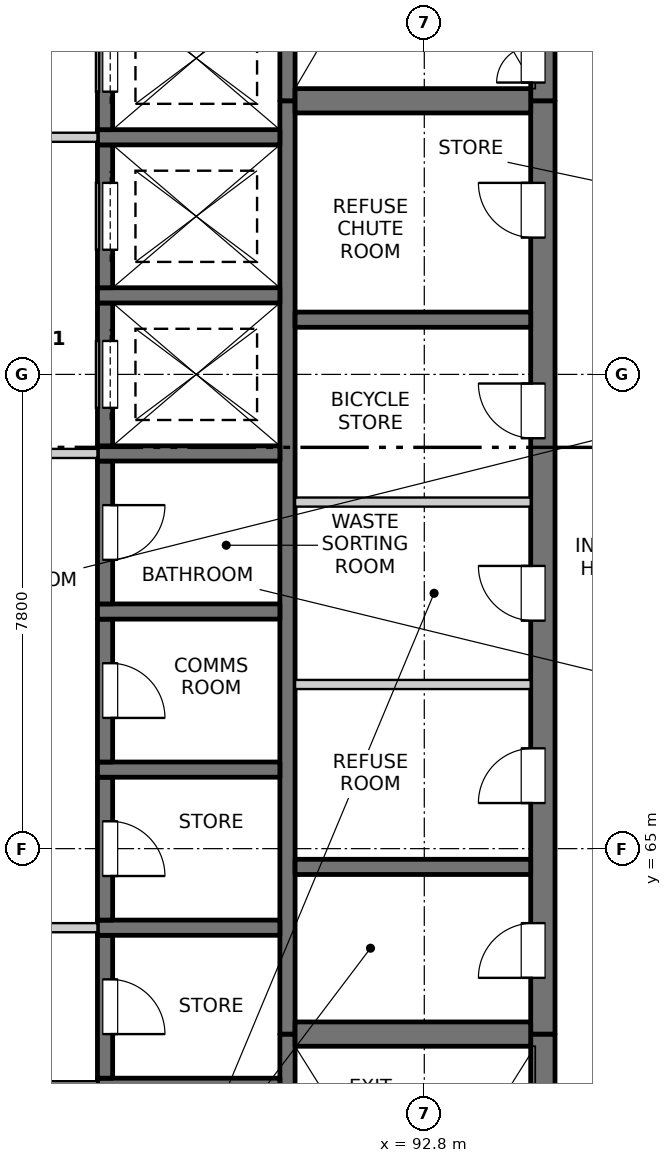
"""IFC4 building model, lengths in metres.
Left out: names, types, materials, properties, quantities, classifications, styles, units other than length and angle.
Written with IfcOpenShell. Run it as: python <this file> out.ifc"""

import sys

from ifc_helpers import new_model, si_unit, direction, frame, frame_2d, origin, place, context, subcontext, project, spatial, rectangle, extrude, element, fill, save


model = new_model("IFC4")
c1 = context("Model", 3, precision=1e-05, world=origin(), true_north=direction((0.0, 1.0)))
c2 = subcontext(c1, "Body", "Model", "MODEL_VIEW")
j1 = project(units=[si_unit("LENGTHUNIT", "METRE"), si_unit("PLANEANGLEUNIT", "RADIAN")], contexts=[c1])
p1 = place(None, origin())
s1 = spatial("IfcSite", under=j1, at=p1, CompositionType="ELEMENT")
p2 = place(p1, origin())
s2 = spatial("IfcBuilding", under=s1, at=p2, CompositionType="ELEMENT")
p3 = place(p2, frame((0.0, 0.0, 197.3)))
s3 = spatial("IfcBuildingStorey", under=s2, at=p3, CompositionType="ELEMENT", Elevation=197.3)
p4 = place(p3, frame((94.75, 55.05, -0.3), z_axis=(0.0, 0.0, 1.0), x_axis=(0.0, 1.0, 0.0)))
e1 = element("IfcWall", 1, at=p4, inside=s3, PredefinedType="SOLIDWALL", context=c2, shape_type="SweptSolid", body=[
    extrude(rectangle(XDim=6.9, YDim=0.4, at=frame_2d((3.45, 0.0))), origin(), (0.0, 0.0, 1.0), 3.45),
])
p5 = place(p4, frame((0.6, 0.0, 0.3)))
e2 = element("IfcOpeningElement", 2, at=p5, cuts=e1, PredefinedType="OPENING", context=c2, shape_type="SweptSolid", body=[
    extrude(rectangle(XDim=1.2, YDim=2.1, at=frame_2d((0.6, 1.05))), frame((0.0, 0.21, 0.0), z_axis=(0.0, -1.0, 0.0), x_axis=(1.0, 0.0, 0.0)), (0.0, 0.0, 1.0), 0.42),
])
p6 = place(p3, frame((94.75, 61.95, -0.3), z_axis=(0.0, 0.0, 1.0), x_axis=(0.0, 1.0, 0.0)))
e3 = element("IfcWall", 3, at=p6, inside=s3, PredefinedType="SOLIDWALL", context=c2, shape_type="SweptSolid", body=[
    extrude(rectangle(XDim=15.35, YDim=0.4, at=frame_2d((7.675, 0.0))), origin(), (0.0, 0.0, 1.0), 3.45),
])
p7 = place(p6, frame((0.925, 0.0, 0.3)))
e4 = element("IfcOpeningElement", 4, at=p7, cuts=e3, PredefinedType="OPENING", context=c2, shape_type="SweptSolid", body=[
    extrude(rectangle(XDim=0.9, YDim=2.1, at=frame_2d((0.45, 1.05))), frame((0.0, 0.21, 0.0), z_axis=(0.0, -1.0, 0.0), x_axis=(1.0, 0.0, 0.0)), (0.0, 0.0, 1.0), 0.42),
])
p8 = place(p6, frame((3.8, 0.0, 0.3)))
e5 = element("IfcOpeningElement", 5, at=p8, cuts=e3, PredefinedType="OPENING", context=c2, shape_type="SweptSolid", body=[
    extrude(rectangle(XDim=0.9, YDim=2.1, at=frame_2d((0.45, 1.05))), frame((0.0, 0.21, 0.0), z_axis=(0.0, -1.0, 0.0), x_axis=(1.0, 0.0, 0.0)), (0.0, 0.0, 1.0), 0.42),
])
p9 = place(p6, frame((6.8, 0.0, 0.3)))
e6 = element("IfcOpeningElement", 6, at=p9, cuts=e3, PredefinedType="OPENING", context=c2, shape_type="SweptSolid", body=[
    extrude(rectangle(XDim=0.9, YDim=2.1, at=frame_2d((0.45, 1.05))), frame((0.0, 0.21, 0.0), z_axis=(0.0, -1.0, 0.0), x_axis=(1.0, 0.0, 0.0)), (0.0, 0.0, 1.0), 0.42),
])
p10 = place(p6, frame((9.8, 0.0, 0.3)))
e7 = element("IfcOpeningElement", 7, at=p10, cuts=e3, PredefinedType="OPENING", context=c2, shape_type="SweptSolid", body=[
    extrude(rectangle(XDim=0.9, YDim=2.1, at=frame_2d((0.45, 1.05))), frame((0.0, 0.21, 0.0), z_axis=(0.0, -1.0, 0.0), x_axis=(1.0, 0.0, 0.0)), (0.0, 0.0, 1.0), 0.42),
])
p11 = place(p6, frame((13.1, 0.0, 0.3)))
e8 = element("IfcOpeningElement", 8, at=p11, cuts=e3, PredefinedType="OPENING", context=c2, shape_type="SweptSolid", body=[
    extrude(rectangle(XDim=0.9, YDim=2.1, at=frame_2d((0.45, 1.05))), frame((0.0, 0.21, 0.0), z_axis=(0.0, -1.0, 0.0), x_axis=(1.0, 0.0, 0.0)), (0.0, 0.0, 1.0), 0.42),
])
p12 = place(p3, frame((94.75, 77.3, -0.3), z_axis=(0.0, 0.0, 1.0), x_axis=(0.0, 1.0, 0.0)))
e9 = element("IfcWall", 9, at=p12, inside=s3, PredefinedType="SOLIDWALL", context=c2, shape_type="SweptSolid", body=[
    extrude(rectangle(XDim=7.4, YDim=0.4, at=frame_2d((3.7, 0.0))), origin(), (0.0, 0.0, 1.0), 3.45),
])
p13 = place(p12, frame((0.3, 0.0, 0.3)))
e10 = element("IfcOpeningElement", 10, at=p13, cuts=e9, PredefinedType="OPENING", context=c2, shape_type="SweptSolid", body=[
    extrude(rectangle(XDim=1.2, YDim=2.1, at=frame_2d((0.6, 1.05))), frame((0.0, 0.21, 0.0), z_axis=(0.0, -1.0, 0.0), x_axis=(1.0, 0.0, 0.0)), (0.0, 0.0, 1.0), 0.42),
])
p14 = place(p3, frame((90.55, 55.45, -0.3), z_axis=(0.0, 0.0, 1.0), x_axis=(0.0, 1.0, 0.0)))
e11 = element("IfcWall", 11, at=p14, inside=s3, PredefinedType="SOLIDWALL", context=c2, shape_type="SweptSolid", body=[
    extrude(rectangle(XDim=6.5, YDim=0.25, at=frame_2d((3.25, 0.0))), origin(), (0.0, 0.0, 1.0), 3.45),
])
p15 = place(p3, frame((90.55, 61.95, -0.3), z_axis=(0.0, 0.0, 1.0), x_axis=(0.0, 1.0, 0.0)))
e12 = element("IfcWall", 12, at=p15, inside=s3, PredefinedType="SOLIDWALL", context=c2, shape_type="SweptSolid", body=[
    extrude(rectangle(XDim=15.35, YDim=0.25, at=frame_2d((7.675, 0.0))), origin(), (0.0, 0.0, 1.0), 3.45),
])
p16 = place(p3, frame((90.55, 77.3, -0.3), z_axis=(0.0, 0.0, 1.0), x_axis=(0.0, 1.0, 0.0)))
e13 = element("IfcWall", 13, at=p16, inside=s3, PredefinedType="SOLIDWALL", context=c2, shape_type="SweptSolid", body=[
    extrude(rectangle(XDim=7.0, YDim=0.25, at=frame_2d((3.5, 0.0))), origin(), (0.0, 0.0, 1.0), 3.45),
])
p17 = place(p3, frame((87.425, 61.1, -0.3), z_axis=(0.0, 0.0, 1.0), x_axis=(1.0, 0.0, 0.0)))
e14 = element("IfcWall", 14, at=p17, inside=s3, PredefinedType="SOLIDWALL", context=c2, shape_type="SweptSolid", body=[
    extrude(rectangle(XDim=3.0, YDim=0.25, at=frame_2d((1.5, 0.0))), origin(), (0.0, 0.0, 1.0), 3.45),
])
p18 = place(p3, frame((87.55, 61.225, -0.3), z_axis=(0.0, 0.0, 1.0), x_axis=(0.0, 1.0, 0.0)))
e15 = element("IfcWall", 15, at=p18, inside=s3, PredefinedType="SOLIDWALL", context=c2, shape_type="SweptSolid", body=[
    extrude(rectangle(XDim=2.35, YDim=0.25, at=frame_2d((1.175, 0.0))), origin(), (0.0, 0.0, 1.0), 3.45),
])
p19 = place(p18, frame((0.725, 0.0, 0.3)))
e16 = element("IfcOpeningElement", 16, at=p19, cuts=e15, PredefinedType="OPENING", context=c2, shape_type="SweptSolid", body=[
    extrude(rectangle(XDim=0.9, YDim=2.1, at=frame_2d((0.45, 1.05))), frame((0.0, 0.135, 0.0), z_axis=(0.0, -1.0, 0.0), x_axis=(1.0, 0.0, 0.0)), (0.0, 0.0, 1.0), 0.27),
])
p20 = place(p3, frame((87.425, 63.7, -0.3), z_axis=(0.0, 0.0, 1.0), x_axis=(1.0, 0.0, 0.0)))
e17 = element("IfcWall", 17, at=p20, inside=s3, PredefinedType="SOLIDWALL", context=c2, shape_type="SweptSolid", body=[
    extrude(rectangle(XDim=3.0, YDim=0.25, at=frame_2d((1.5, 0.0))), origin(), (0.0, 0.0, 1.0), 3.45),
])
p21 = place(p3, frame((87.55, 63.825, -0.3), z_axis=(0.0, 0.0, 1.0), x_axis=(0.0, 1.0, 0.0)))
e18 = element("IfcWall", 18, at=p21, inside=s3, PredefinedType="SOLIDWALL", context=c2, shape_type="SweptSolid", body=[
    extrude(rectangle(XDim=2.35, YDim=0.25, at=frame_2d((1.175, 0.0))), origin(), (0.0, 0.0, 1.0), 3.45),
])
p22 = place(p21, frame((0.725, 0.0, 0.3)))
e19 = element("IfcOpeningElement", 19, at=p22, cuts=e18, PredefinedType="OPENING", context=c2, shape_type="SweptSolid", body=[
    extrude(rectangle(XDim=0.9, YDim=2.1, at=frame_2d((0.45, 1.05))), frame((0.0, 0.135, 0.0), z_axis=(0.0, -1.0, 0.0), x_axis=(1.0, 0.0, 0.0)), (0.0, 0.0, 1.0), 0.27),
])
p23 = place(p3, frame((87.425, 66.3, -0.3), z_axis=(0.0, 0.0, 1.0), x_axis=(1.0, 0.0, 0.0)))
e20 = element("IfcWall", 20, at=p23, inside=s3, PredefinedType="SOLIDWALL", context=c2, shape_type="SweptSolid", body=[
    extrude(rectangle(XDim=3.0, YDim=0.25, at=frame_2d((1.5, 0.0))), origin(), (0.0, 0.0, 1.0), 3.45),
])
p24 = place(p3, frame((87.55, 66.425, -0.3), z_axis=(0.0, 0.0, 1.0), x_axis=(0.0, 1.0, 0.0)))
e21 = element("IfcWall", 21, at=p24, inside=s3, PredefinedType="SOLIDWALL", context=c2, shape_type="SweptSolid", body=[
    extrude(rectangle(XDim=2.35, YDim=0.25, at=frame_2d((1.175, 0.0))), origin(), (0.0, 0.0, 1.0), 3.45),
])
p25 = place(p24, frame((0.725, 0.0, 0.3)))
e22 = element("IfcOpeningElement", 22, at=p25, cuts=e21, PredefinedType="OPENING", context=c2, shape_type="SweptSolid", body=[
    extrude(rectangle(XDim=0.9, YDim=2.1, at=frame_2d((0.45, 1.05))), frame((0.0, 0.135, 0.0), z_axis=(0.0, -1.0, 0.0), x_axis=(1.0, 0.0, 0.0)), (0.0, 0.0, 1.0), 0.27),
])
p26 = place(p3, frame((87.425, 68.9, -0.3), z_axis=(0.0, 0.0, 1.0), x_axis=(1.0, 0.0, 0.0)))
e23 = element("IfcWall", 23, at=p26, inside=s3, PredefinedType="SOLIDWALL", context=c2, shape_type="SweptSolid", body=[
    extrude(rectangle(XDim=3.0, YDim=0.25, at=frame_2d((1.5, 0.0))), origin(), (0.0, 0.0, 1.0), 3.45),
])
p27 = place(p3, frame((87.55, 69.025, -0.3), z_axis=(0.0, 0.0, 1.0), x_axis=(0.0, 1.0, 0.0)))
e24 = element("IfcWall", 24, at=p27, inside=s3, PredefinedType="SOLIDWALL", context=c2, shape_type="SweptSolid", body=[
    extrude(rectangle(XDim=2.35, YDim=0.25, at=frame_2d((1.175, 0.0))), origin(), (0.0, 0.0, 1.0), 3.45),
])
p28 = place(p27, frame((0.725, 0.0, 0.3)))
e25 = element("IfcOpeningElement", 25, at=p28, cuts=e24, PredefinedType="OPENING", context=c2, shape_type="SweptSolid", body=[
    extrude(rectangle(XDim=0.9, YDim=2.1, at=frame_2d((0.45, 1.05))), frame((0.0, 0.135, 0.0), z_axis=(0.0, -1.0, 0.0), x_axis=(1.0, 0.0, 0.0)), (0.0, 0.0, 1.0), 0.27),
])
p29 = place(p3, frame((87.425, 71.5, -0.3), z_axis=(0.0, 0.0, 1.0), x_axis=(1.0, 0.0, 0.0)))
e26 = element("IfcWall", 26, at=p29, inside=s3, PredefinedType="SOLIDWALL", context=c2, shape_type="SweptSolid", body=[
    extrude(rectangle(XDim=3.0, YDim=0.25, at=frame_2d((1.5, 0.0))), origin(), (0.0, 0.0, 1.0), 3.45),
])
p30 = place(p3, frame((87.55, 71.625, -0.3), z_axis=(0.0, 0.0, 1.0), x_axis=(0.0, 1.0, 0.0)))
e27 = element("IfcWall", 27, at=p30, inside=s3, PredefinedType="SOLIDWALL", context=c2, shape_type="SweptSolid", body=[
    extrude(rectangle(XDim=2.35, YDim=0.25, at=frame_2d((1.175, 0.0))), origin(), (0.0, 0.0, 1.0), 3.45),
])
p31 = place(p30, frame((0.625, 0.0, 0.3)))
e28 = element("IfcOpeningElement", 28, at=p31, cuts=e27, PredefinedType="OPENING", context=c2, shape_type="SweptSolid", body=[
    extrude(rectangle(XDim=1.1, YDim=2.1, at=frame_2d((0.55, 1.05))), frame((0.0, 0.135, 0.0), z_axis=(0.0, -1.0, 0.0), x_axis=(1.0, 0.0, 0.0)), (0.0, 0.0, 1.0), 0.27),
])
p32 = place(p3, frame((87.425, 74.1, -0.3), z_axis=(0.0, 0.0, 1.0), x_axis=(1.0, 0.0, 0.0)))
e29 = element("IfcWall", 29, at=p32, inside=s3, PredefinedType="SOLIDWALL", context=c2, shape_type="SweptSolid", body=[
    extrude(rectangle(XDim=3.0, YDim=0.25, at=frame_2d((1.5, 0.0))), origin(), (0.0, 0.0, 1.0), 3.45),
])
p33 = place(p3, frame((87.55, 74.225, -0.3), z_axis=(0.0, 0.0, 1.0), x_axis=(0.0, 1.0, 0.0)))
e30 = element("IfcWall", 30, at=p33, inside=s3, PredefinedType="SOLIDWALL", context=c2, shape_type="SweptSolid", body=[
    extrude(rectangle(XDim=2.35, YDim=0.25, at=frame_2d((1.175, 0.0))), origin(), (0.0, 0.0, 1.0), 3.45),
])
p34 = place(p33, frame((0.625, 0.0, 0.3)))
e31 = element("IfcOpeningElement", 31, at=p34, cuts=e30, PredefinedType="OPENING", context=c2, shape_type="SweptSolid", body=[
    extrude(rectangle(XDim=1.1, YDim=2.1, at=frame_2d((0.55, 1.05))), frame((0.0, 0.135, 0.0), z_axis=(0.0, -1.0, 0.0), x_axis=(1.0, 0.0, 0.0)), (0.0, 0.0, 1.0), 0.27),
])
p35 = place(p3, frame((87.425, 76.7, -0.3), z_axis=(0.0, 0.0, 1.0), x_axis=(1.0, 0.0, 0.0)))
e32 = element("IfcWall", 32, at=p35, inside=s3, PredefinedType="SOLIDWALL", context=c2, shape_type="SweptSolid", body=[
    extrude(rectangle(XDim=3.0, YDim=0.25, at=frame_2d((1.5, 0.0))), origin(), (0.0, 0.0, 1.0), 3.45),
])
p36 = place(p3, frame((87.55, 76.825, -0.3), z_axis=(0.0, 0.0, 1.0), x_axis=(0.0, 1.0, 0.0)))
e33 = element("IfcWall", 33, at=p36, inside=s3, PredefinedType="SOLIDWALL", context=c2, shape_type="SweptSolid", body=[
    extrude(rectangle(XDim=2.35, YDim=0.25, at=frame_2d((1.175, 0.0))), origin(), (0.0, 0.0, 1.0), 3.45),
])
p37 = place(p36, frame((0.625, 0.0, 0.3)))
e34 = element("IfcOpeningElement", 34, at=p37, cuts=e33, PredefinedType="OPENING", context=c2, shape_type="SweptSolid", body=[
    extrude(rectangle(XDim=1.1, YDim=2.1, at=frame_2d((0.55, 1.05))), frame((0.0, 0.135, 0.0), z_axis=(0.0, -1.0, 0.0), x_axis=(1.0, 0.0, 0.0)), (0.0, 0.0, 1.0), 0.27),
])
p38 = place(p3, frame((90.675, 61.95, -0.3), z_axis=(0.0, 0.0, 1.0), x_axis=(1.0, 0.0, 0.0)))
e35 = element("IfcWall", 35, at=p38, inside=s3, PredefinedType="SOLIDWALL", context=c2, shape_type="SweptSolid", body=[
    extrude(rectangle(XDim=3.875, YDim=0.4, at=frame_2d((1.938, 0.0))), origin(), (0.0, 0.0, 1.0), 3.45),
])
for number, where, z_axis, x_axis in (
    (36, (90.675, 64.7, -0.3), (0.0, 0.0, 1.0), (1.0, 0.0, 0.0)),
    (37, (90.675, 73.7, -0.3), (0.0, 0.0, 1.0), (1.0, 0.0, 0.0)),
):
    element("IfcWall", number, at=place(p3, frame(where, z_axis=z_axis, x_axis=x_axis)), inside=s3, PredefinedType="SOLIDWALL", context=c2, shape_type="SweptSolid", body=[
        extrude(rectangle(XDim=3.875, YDim=0.25, at=frame_2d((1.938, 0.0))), origin(), (0.0, 0.0, 1.0), 3.45),
    ])
p39 = place(p3, frame((90.675, 77.3, -0.3), z_axis=(0.0, 0.0, 1.0), x_axis=(1.0, 0.0, 0.0)))
e38 = element("IfcWall", 38, at=p39, inside=s3, PredefinedType="SOLIDWALL", context=c2, shape_type="SweptSolid", body=[
    extrude(rectangle(XDim=3.875, YDim=0.4, at=frame_2d((1.938, 0.0))), origin(), (0.0, 0.0, 1.0), 3.45),
])
p40 = place(p3, frame((82.575, 61.1, 0.0), z_axis=(0.0, 0.0, 1.0), x_axis=(1.0, 0.0, 0.0)))
e39 = element("IfcWall", 39, at=p40, inside=s3, PredefinedType="PARTITIONING", context=c2, shape_type="SweptSolid", body=[
    extrude(rectangle(XDim=4.85, YDim=0.15, at=frame_2d((2.425, 0.0))), origin(), (0.0, 0.0, 1.0), 3.15),
])
p41 = place(p40, frame((1.525, 0.0, 0.0)))
e40 = element("IfcOpeningElement", 40, at=p41, cuts=e39, PredefinedType="OPENING", context=c2, shape_type="SweptSolid", body=[
    extrude(rectangle(XDim=1.8, YDim=2.1, at=frame_2d((0.9, 1.05))), frame((0.0, 0.085, 0.0), z_axis=(0.0, -1.0, 0.0), x_axis=(1.0, 0.0, 0.0)), (0.0, 0.0, 1.0), 0.17),
])
p42 = place(p3, frame((82.575, 63.7, 0.0), z_axis=(0.0, 0.0, 1.0), x_axis=(1.0, 0.0, 0.0)))
e41 = element("IfcWall", 41, at=p42, inside=s3, PredefinedType="PARTITIONING", context=c2, shape_type="SweptSolid", body=[
    extrude(rectangle(XDim=4.85, YDim=0.15, at=frame_2d((2.425, 0.0))), origin(), (0.0, 0.0, 1.0), 3.15),
])
p43 = place(p42, frame((1.525, 0.0, 0.0)))
e42 = element("IfcOpeningElement", 42, at=p43, cuts=e41, PredefinedType="OPENING", context=c2, shape_type="SweptSolid", body=[
    extrude(rectangle(XDim=1.8, YDim=2.1, at=frame_2d((0.9, 1.05))), frame((0.0, 0.085, 0.0), z_axis=(0.0, -1.0, 0.0), x_axis=(1.0, 0.0, 0.0)), (0.0, 0.0, 1.0), 0.17),
])
for number, where, z_axis, x_axis in (
    (43, (90.675, 67.7, 0.0), (0.0, 0.0, 1.0), (1.0, 0.0, 0.0)),
    (44, (90.675, 70.7, 0.0), (0.0, 0.0, 1.0), (1.0, 0.0, 0.0)),
):
    element("IfcWall", number, at=place(p3, frame(where, z_axis=z_axis, x_axis=x_axis)), inside=s3, PredefinedType="PARTITIONING", context=c2, shape_type="SweptSolid", body=[
        extrude(rectangle(XDim=3.875, YDim=0.15, at=frame_2d((1.938, 0.0))), origin(), (0.0, 0.0, 1.0), 3.15),
    ])
p44 = place(p3, frame((82.575, 71.5, 0.0), z_axis=(0.0, 0.0, 1.0), x_axis=(1.0, 0.0, 0.0)))
e45 = element("IfcWall", 45, at=p44, inside=s3, PredefinedType="PARTITIONING", context=c2, shape_type="SweptSolid", body=[
    extrude(rectangle(XDim=4.85, YDim=0.15, at=frame_2d((2.425, 0.0))), origin(), (0.0, 0.0, 1.0), 3.15),
])
p45 = place(p44, frame((1.525, 0.0, 0.0)))
e46 = element("IfcOpeningElement", 46, at=p45, cuts=e45, PredefinedType="OPENING", context=c2, shape_type="SweptSolid", body=[
    extrude(rectangle(XDim=1.8, YDim=2.1, at=frame_2d((0.9, 1.05))), frame((0.0, 0.085, 0.0), z_axis=(0.0, -1.0, 0.0), x_axis=(1.0, 0.0, 0.0)), (0.0, 0.0, 1.0), 0.17),
])
p46 = place(p3, frame((82.575, 76.7, 0.0), z_axis=(0.0, 0.0, 1.0), x_axis=(1.0, 0.0, 0.0)))
e47 = element("IfcWall", 47, at=p46, inside=s3, PredefinedType="PARTITIONING", context=c2, shape_type="SweptSolid", body=[
    extrude(rectangle(XDim=4.85, YDim=0.15, at=frame_2d((2.425, 0.0))), origin(), (0.0, 0.0, 1.0), 3.15),
])
p47 = place(p46, frame((1.525, 0.0, 0.0)))
e48 = element("IfcOpeningElement", 48, at=p47, cuts=e47, PredefinedType="OPENING", context=c2, shape_type="SweptSolid", body=[
    extrude(rectangle(XDim=1.8, YDim=2.1, at=frame_2d((0.9, 1.05))), frame((0.0, 0.085, 0.0), z_axis=(0.0, -1.0, 0.0), x_axis=(1.0, 0.0, 0.0)), (0.0, 0.0, 1.0), 0.17),
])
p48 = place(p19, origin())
e49 = element("IfcDoor", 49, at=p48, inside=s3, OperationType="SINGLE_SWING_RIGHT", PredefinedType="DOOR", context=c2, shape_type="SweptSolid", body=[
    extrude(rectangle(XDim=0.9, YDim=2.1, at=frame_2d((0.45, 1.05))), frame((0.0, -0.06, 0.0), z_axis=(0.0, -1.0, 0.0), x_axis=(1.0, 0.0, 0.0)), (0.0, 0.0, 1.0), 0.05),
])
fill(e16, e49)
p49 = place(p7, origin())
e50 = element("IfcDoor", 50, at=p49, inside=s3, OperationType="SINGLE_SWING_LEFT", PredefinedType="DOOR", context=c2, shape_type="SweptSolid", body=[
    extrude(rectangle(XDim=0.9, YDim=2.1, at=frame_2d((0.45, 1.05))), frame((0.0, 0.185, 0.0), z_axis=(0.0, -1.0, 0.0), x_axis=(1.0, 0.0, 0.0)), (0.0, 0.0, 1.0), 0.05),
])
fill(e4, e50)
p50 = place(p22, origin())
e51 = element("IfcDoor", 51, at=p50, inside=s3, OperationType="SINGLE_SWING_RIGHT", PredefinedType="DOOR", context=c2, shape_type="SweptSolid", body=[
    extrude(rectangle(XDim=0.9, YDim=2.1, at=frame_2d((0.45, 1.05))), frame((0.0, -0.06, 0.0), z_axis=(0.0, -1.0, 0.0), x_axis=(1.0, 0.0, 0.0)), (0.0, 0.0, 1.0), 0.05),
])
fill(e19, e51)
p51 = place(p8, origin())
e52 = element("IfcDoor", 52, at=p51, inside=s3, OperationType="SINGLE_SWING_LEFT", PredefinedType="DOOR", context=c2, shape_type="SweptSolid", body=[
    extrude(rectangle(XDim=0.9, YDim=2.1, at=frame_2d((0.45, 1.05))), frame((0.0, 0.185, 0.0), z_axis=(0.0, -1.0, 0.0), x_axis=(1.0, 0.0, 0.0)), (0.0, 0.0, 1.0), 0.05),
])
fill(e5, e52)
p52 = place(p25, origin())
e53 = element("IfcDoor", 53, at=p52, inside=s3, OperationType="SINGLE_SWING_RIGHT", PredefinedType="DOOR", context=c2, shape_type="SweptSolid", body=[
    extrude(rectangle(XDim=0.9, YDim=2.1, at=frame_2d((0.45, 1.05))), frame((0.0, -0.06, 0.0), z_axis=(0.0, -1.0, 0.0), x_axis=(1.0, 0.0, 0.0)), (0.0, 0.0, 1.0), 0.05),
])
fill(e22, e53)
p53 = place(p9, origin())
e54 = element("IfcDoor", 54, at=p53, inside=s3, OperationType="SINGLE_SWING_RIGHT", PredefinedType="DOOR", context=c2, shape_type="SweptSolid", body=[
    extrude(rectangle(XDim=0.9, YDim=2.1, at=frame_2d((0.45, 1.05))), frame((0.0, 0.185, 0.0), z_axis=(0.0, -1.0, 0.0), x_axis=(1.0, 0.0, 0.0)), (0.0, 0.0, 1.0), 0.05),
])
fill(e6, e54)
p54 = place(p28, origin())
e55 = element("IfcDoor", 55, at=p54, inside=s3, OperationType="SINGLE_SWING_LEFT", PredefinedType="DOOR", context=c2, shape_type="SweptSolid", body=[
    extrude(rectangle(XDim=0.9, YDim=2.1, at=frame_2d((0.45, 1.05))), frame((0.0, -0.06, 0.0), z_axis=(0.0, -1.0, 0.0), x_axis=(1.0, 0.0, 0.0)), (0.0, 0.0, 1.0), 0.05),
])
fill(e25, e55)
p55 = place(p10, origin())
e56 = element("IfcDoor", 56, at=p55, inside=s3, OperationType="SINGLE_SWING_RIGHT", PredefinedType="DOOR", context=c2, shape_type="SweptSolid", body=[
    extrude(rectangle(XDim=0.9, YDim=2.1, at=frame_2d((0.45, 1.05))), frame((0.0, 0.185, 0.0), z_axis=(0.0, -1.0, 0.0), x_axis=(1.0, 0.0, 0.0)), (0.0, 0.0, 1.0), 0.05),
])
fill(e7, e56)
p56 = place(p31, origin())
e57 = element("IfcDoor", 57, at=p56, inside=s3, OperationType="SLIDING_TO_LEFT", PredefinedType="DOOR", context=c2, shape_type="SweptSolid", body=[
    extrude(rectangle(XDim=1.1, YDim=2.1, at=frame_2d((0.55, 1.05))), frame((0.0, -0.06, 0.0), z_axis=(0.0, -1.0, 0.0), x_axis=(1.0, 0.0, 0.0)), (0.0, 0.0, 1.0), 0.05),
])
fill(e28, e57)
p57 = place(p34, origin())
e58 = element("IfcDoor", 58, at=p57, inside=s3, OperationType="SLIDING_TO_LEFT", PredefinedType="DOOR", context=c2, shape_type="SweptSolid", body=[
    extrude(rectangle(XDim=1.1, YDim=2.1, at=frame_2d((0.55, 1.05))), frame((0.0, -0.06, 0.0), z_axis=(0.0, -1.0, 0.0), x_axis=(1.0, 0.0, 0.0)), (0.0, 0.0, 1.0), 0.05),
])
fill(e31, e58)
p58 = place(p11, origin())
e59 = element("IfcDoor", 59, at=p58, inside=s3, OperationType="SINGLE_SWING_RIGHT", PredefinedType="DOOR", context=c2, shape_type="SweptSolid", body=[
    extrude(rectangle(XDim=0.9, YDim=2.1, at=frame_2d((0.45, 1.05))), frame((0.0, 0.185, 0.0), z_axis=(0.0, -1.0, 0.0), x_axis=(1.0, 0.0, 0.0)), (0.0, 0.0, 1.0), 0.05),
])
fill(e8, e59)
p59 = place(p37, origin())
e60 = element("IfcDoor", 60, at=p59, inside=s3, OperationType="SLIDING_TO_LEFT", PredefinedType="DOOR", context=c2, shape_type="SweptSolid", body=[
    extrude(rectangle(XDim=1.1, YDim=2.1, at=frame_2d((0.55, 1.05))), frame((0.0, -0.06, 0.0), z_axis=(0.0, -1.0, 0.0), x_axis=(1.0, 0.0, 0.0)), (0.0, 0.0, 1.0), 0.05),
])
fill(e34, e60)
p60 = place(p13, origin())
e61 = element("IfcDoor", 61, at=p60, inside=s3, OperationType="DOUBLE_DOOR_SINGLE_SWING", PredefinedType="DOOR", context=c2, shape_type="SweptSolid", body=[
    extrude(rectangle(XDim=1.2, YDim=2.1, at=frame_2d((0.6, 1.05))), frame((0.0, 0.185, 0.0), z_axis=(0.0, -1.0, 0.0), x_axis=(1.0, 0.0, 0.0)), (0.0, 0.0, 1.0), 0.05),
])
fill(e10, e61)
save(model, sys.argv[1])
